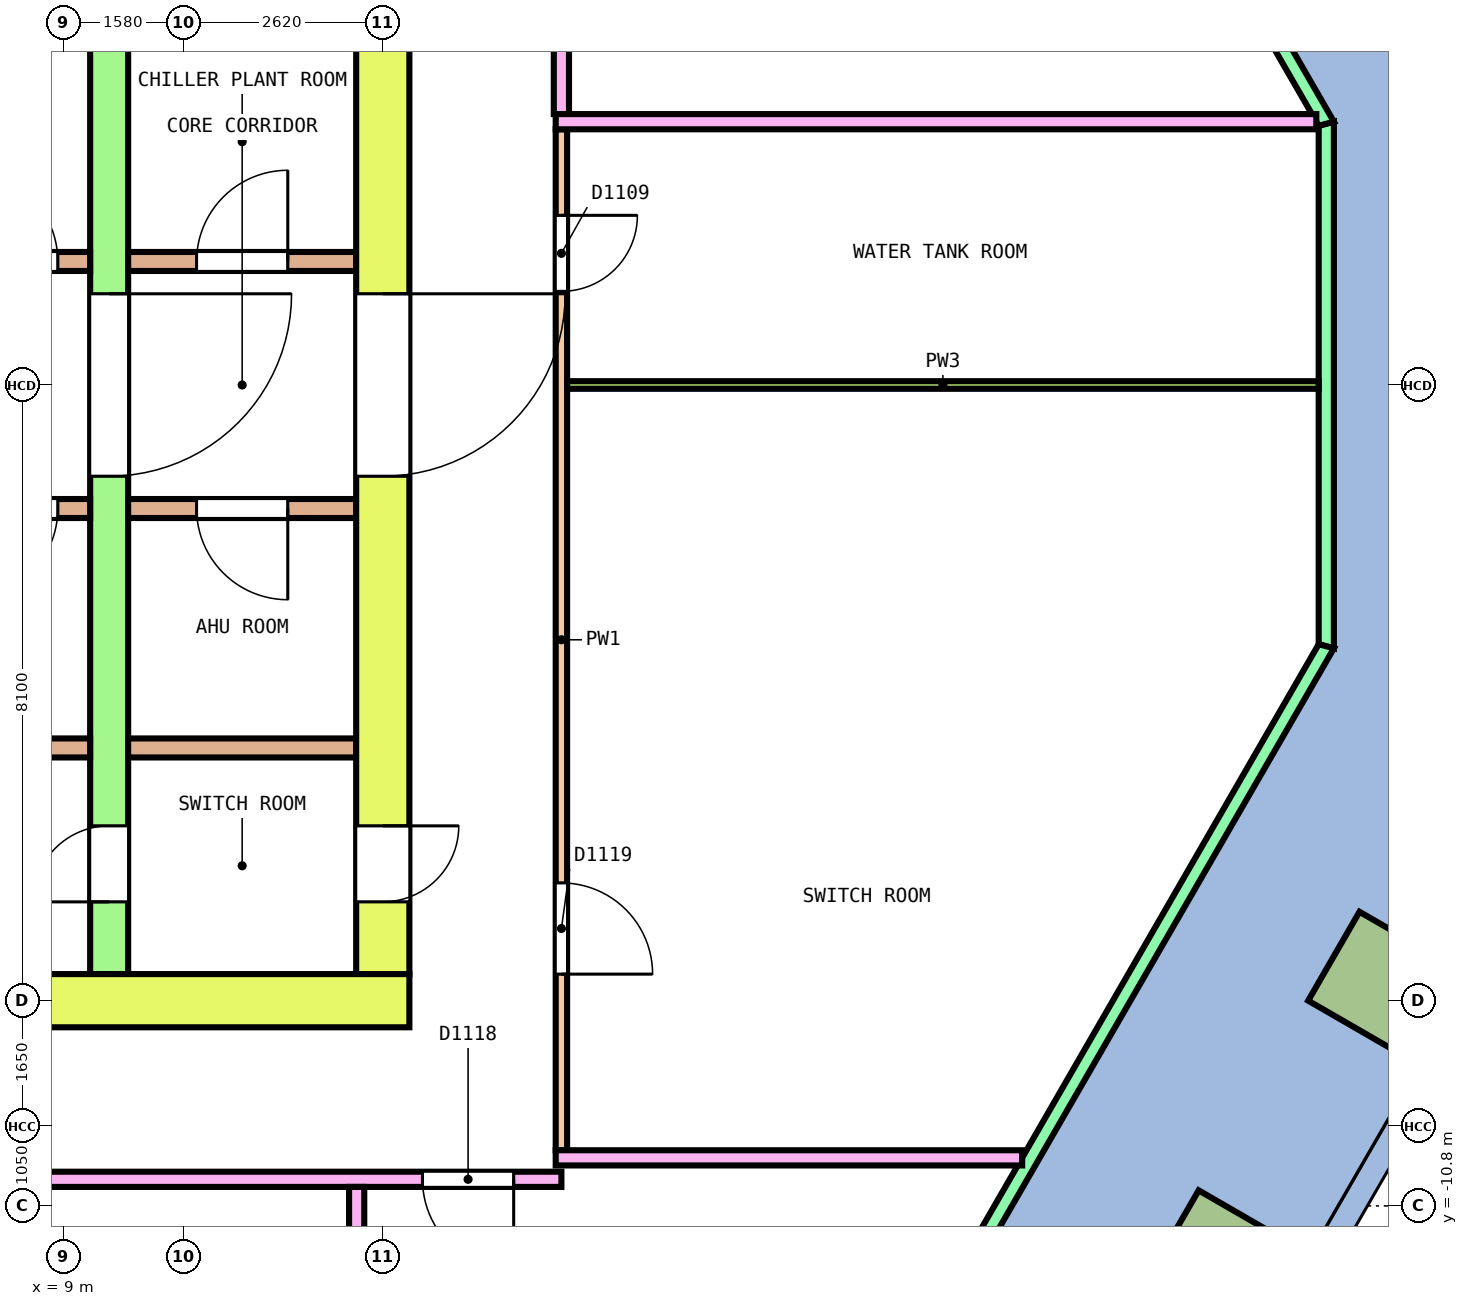
"""IFC4 building model, lengths in metres.
Left out: names, types, materials, properties, quantities, classifications, styles, units other than length and angle.
Written with IfcOpenShell. Run it as: python <this file> out.ifc"""

import sys

from ifc_helpers import new_model, si_unit, direction, frame, frame_2d, origin, origin_2d, place, context, subcontext, project, spatial, polyline, rectangle, outline, extrude, element, fill, save


model = new_model("IFC4")
c1 = context("Model", 3, precision=1e-05, world=origin(), true_north=direction((0.0, 1.0)))
c2 = subcontext(c1, "Body", "Model", "MODEL_VIEW")
j1 = project(units=[si_unit("LENGTHUNIT", "METRE"), si_unit("PLANEANGLEUNIT", "RADIAN")], contexts=[c1])
p1 = place(None, origin())
s1 = spatial("IfcSite", under=j1, at=p1, CompositionType="ELEMENT")
p2 = place(p1, origin())
s2 = spatial("IfcBuilding", under=s1, at=p2, CompositionType="ELEMENT")
p3 = place(p2, frame((0.0, 0.0, 139.6)))
s3 = spatial("IfcBuildingStorey", under=s2, at=p3, CompositionType="ELEMENT", Elevation=139.6)
for number, where, z_axis, x_axis in (
    (1, (24.181, -11.518, 0.0), (0.0, 0.0, 1.0), (0.5, 0.866, 0.0)),
    (2, (26.297, -7.853, 0.0), (0.0, 0.0, 1.0), (0.5, 0.866, 0.0)),
):
    element("IfcColumn", number, at=place(p3, frame(where, z_axis=z_axis, x_axis=x_axis)), inside=s3, PredefinedType="COLUMN", context=c2, shape_type="SweptSolid", body=[
        extrude(rectangle(XDim=1.35, YDim=1.35, at=origin_2d()), origin(), (0.0, 0.0, 1.0), 5.25),
    ])
p4 = place(p3, frame((25.613, -3.437, 0.0), z_axis=(0.0, 0.0, 1.0), x_axis=(0.0, 1.0, 0.0)))
e3 = element("IfcWall", 3, at=p4, inside=s3, PredefinedType="SOLIDWALL", context=c2, shape_type="SweptSolid", body=[
    extrude(outline(polyline([(-0.027, -0.1), (6.901, -0.1), (6.848, 0.1), (0.027, 0.1), (-0.027, -0.1)])), origin(), (0.0, 0.0, 1.0), 4.55),
])
for number, where, z_axis, x_axis in (
    (4, (25.613, 3.437, 0.0), (0.0, 0.0, 1.0), (-0.5, 0.866, 0.0)),
    (5, (15.783, -20.463, 0.0), (0.0, 0.0, 1.0), (0.5, 0.866, 0.0)),
):
    element("IfcWall", number, at=place(p3, frame(where, z_axis=z_axis, x_axis=x_axis)), inside=s3, PredefinedType="SOLIDWALL", context=c2, shape_type="SweptSolid", body=[
        extrude(outline(polyline([(-0.027, -0.1), (19.686, -0.1), (19.632, 0.1), (0.027, 0.1), (-0.027, -0.1)])), origin(), (0.0, 0.0, 1.0), 4.55),
    ])
p5 = place(p3, frame((-13.55, -8.1, 0.0), z_axis=(0.0, 0.0, 1.0), x_axis=(1.0, 0.0, 0.0)))
e6 = element("IfcWall", 6, at=p5, inside=s3, PredefinedType="SHEAR", context=c2, shape_type="SweptSolid", body=[
    extrude(rectangle(XDim=27.1, YDim=0.7, at=frame_2d((13.55, 0.0))), origin(), (0.0, 0.0, 1.0), 5.3),
])
p6 = place(p5, frame((15.1, 0.0, 0.0)))
e7 = element("IfcOpeningElement", 7, at=p6, cuts=e6, PredefinedType="OPENING", context=c2, shape_type="SweptSolid", body=[
    extrude(rectangle(XDim=1.2, YDim=2.1, at=frame_2d((0.6, 1.05))), frame((0.0, 0.36, 0.0), z_axis=(0.0, -1.0, 0.0), x_axis=(1.0, 0.0, 0.0)), (0.0, 0.0, 1.0), 0.72),
])
p7 = place(p3, frame((13.2, -7.75, 0.0), z_axis=(0.0, 0.0, 1.0), x_axis=(0.0, 1.0, 0.0)))
e8 = element("IfcWall", 8, at=p7, inside=s3, PredefinedType="SHEAR", context=c2, shape_type="SweptSolid", body=[
    extrude(rectangle(XDim=15.5, YDim=0.7, at=frame_2d((7.75, 0.0))), origin(), (0.0, 0.0, 1.0), 5.3),
])
p8 = place(p7, frame((6.55, 0.0, 0.0)))
e9 = element("IfcOpeningElement", 9, at=p8, cuts=e8, PredefinedType="OPENING", context=c2, shape_type="SweptSolid", body=[
    extrude(rectangle(XDim=2.4, YDim=2.1, at=frame_2d((1.2, 1.05))), frame((0.0, 0.36, 0.0), z_axis=(0.0, -1.0, 0.0), x_axis=(1.0, 0.0, 0.0)), (0.0, 0.0, 1.0), 0.72),
])
p9 = place(p7, frame((13.45, 0.0, 0.0)))
e10 = element("IfcOpeningElement", 10, at=p9, cuts=e8, PredefinedType="OPENING", context=c2, shape_type="SweptSolid", body=[
    extrude(rectangle(XDim=1.2, YDim=2.1, at=frame_2d((0.6, 1.05))), frame((0.0, 0.36, 0.0), z_axis=(0.0, -1.0, 0.0), x_axis=(1.0, 0.0, 0.0)), (0.0, 0.0, 1.0), 0.72),
])
p10 = place(p7, frame((0.95, 0.0, 0.0)))
e11 = element("IfcOpeningElement", 11, at=p10, cuts=e8, PredefinedType="OPENING", context=c2, shape_type="SweptSolid", body=[
    extrude(rectangle(XDim=1.0, YDim=2.1, at=frame_2d((0.5, 1.05))), frame((0.0, 0.36, 0.0), z_axis=(0.0, -1.0, 0.0), x_axis=(1.0, 0.0, 0.0)), (0.0, 0.0, 1.0), 0.72),
])
p11 = place(p3, frame((9.6, -7.75, 0.0), z_axis=(0.0, 0.0, 1.0), x_axis=(0.0, 1.0, 0.0)))
e12 = element("IfcWall", 12, at=p11, inside=s3, PredefinedType="SHEAR", context=c2, shape_type="SweptSolid", body=[
    extrude(rectangle(XDim=15.5, YDim=0.5, at=frame_2d((7.75, 0.0))), origin(), (0.0, 0.0, 1.0), 5.3),
])
p12 = place(p11, frame((6.55, 0.0, 0.0)))
e13 = element("IfcOpeningElement", 13, at=p12, cuts=e12, PredefinedType="OPENING", context=c2, shape_type="SweptSolid", body=[
    extrude(rectangle(XDim=2.4, YDim=2.1, at=frame_2d((1.2, 1.05))), frame((0.0, 0.26, 0.0), z_axis=(0.0, -1.0, 0.0), x_axis=(1.0, 0.0, 0.0)), (0.0, 0.0, 1.0), 0.52),
])
p13 = place(p11, frame((13.45, 0.0, 0.0)))
e14 = element("IfcOpeningElement", 14, at=p13, cuts=e12, PredefinedType="OPENING", context=c2, shape_type="SweptSolid", body=[
    extrude(rectangle(XDim=1.2, YDim=2.1, at=frame_2d((0.6, 1.05))), frame((0.0, 0.26, 0.0), z_axis=(0.0, -1.0, 0.0), x_axis=(1.0, 0.0, 0.0)), (0.0, 0.0, 1.0), 0.52),
])
p14 = place(p11, frame((0.95, 0.0, 0.0)))
e15 = element("IfcOpeningElement", 15, at=p14, cuts=e12, PredefinedType="OPENING", context=c2, shape_type="SweptSolid", body=[
    extrude(rectangle(XDim=1.0, YDim=2.1, at=frame_2d((0.5, 1.05))), frame((0.0, 0.26, 0.0), z_axis=(0.0, -1.0, 0.0), x_axis=(1.0, 0.0, 0.0)), (0.0, 0.0, 1.0), 0.52),
])
p15 = place(p3, frame((-9.35, 1.625, 0.0), z_axis=(0.0, 0.0, 1.0), x_axis=(1.0, 0.0, 0.0)))
e16 = element("IfcWall", 16, at=p15, inside=s3, PredefinedType="SOLIDWALL", context=c2, shape_type="SweptSolid", body=[
    extrude(rectangle(XDim=18.7, YDim=0.25, at=frame_2d((9.35, 0.0))), origin(), (0.0, 0.0, 1.0), 5.3),
])
p16 = place(p15, frame((2.85, 0.0, 0.0)))
e17 = element("IfcOpeningElement", 17, at=p16, cuts=e16, PredefinedType="OPENING", context=c2, shape_type="SweptSolid", body=[
    extrude(rectangle(XDim=1.1, YDim=2.1, at=frame_2d((0.55, 1.05))), frame((0.0, 0.135, 0.0), z_axis=(0.0, -1.0, 0.0), x_axis=(1.0, 0.0, 0.0)), (0.0, 0.0, 1.0), 0.27),
])
p17 = place(p15, frame((5.15, 0.0, 0.0)))
e18 = element("IfcOpeningElement", 18, at=p17, cuts=e16, PredefinedType="OPENING", context=c2, shape_type="SweptSolid", body=[
    extrude(rectangle(XDim=1.1, YDim=2.1, at=frame_2d((0.55, 1.05))), frame((0.0, 0.135, 0.0), z_axis=(0.0, -1.0, 0.0), x_axis=(1.0, 0.0, 0.0)), (0.0, 0.0, 1.0), 0.27),
])
p18 = place(p15, frame((14.8, 0.0, 0.0)))
e19 = element("IfcOpeningElement", 19, at=p18, cuts=e16, PredefinedType="OPENING", context=c2, shape_type="SweptSolid", body=[
    extrude(rectangle(XDim=1.1, YDim=2.1, at=frame_2d((0.55, 1.05))), frame((0.0, 0.135, 0.0), z_axis=(0.0, -1.0, 0.0), x_axis=(1.0, 0.0, 0.0)), (0.0, 0.0, 1.0), 0.27),
])
p19 = place(p15, frame((0.425, 0.0, 0.0)))
e20 = element("IfcOpeningElement", 20, at=p19, cuts=e16, PredefinedType="OPENING", context=c2, shape_type="SweptSolid", body=[
    extrude(rectangle(XDim=1.2, YDim=2.1, at=frame_2d((0.6, 1.05))), frame((0.0, 0.135, 0.0), z_axis=(0.0, -1.0, 0.0), x_axis=(1.0, 0.0, 0.0)), (0.0, 0.0, 1.0), 0.27),
])
p20 = place(p15, frame((17.075, 0.0, 0.0)))
e21 = element("IfcOpeningElement", 21, at=p20, cuts=e16, PredefinedType="OPENING", context=c2, shape_type="SweptSolid", body=[
    extrude(rectangle(XDim=1.2, YDim=2.1, at=frame_2d((0.6, 1.05))), frame((0.0, 0.135, 0.0), z_axis=(0.0, -1.0, 0.0), x_axis=(1.0, 0.0, 0.0)), (0.0, 0.0, 1.0), 0.27),
])
p21 = place(p3, frame((9.85, 1.625, 0.0), z_axis=(0.0, 0.0, 1.0), x_axis=(1.0, 0.0, 0.0)))
e22 = element("IfcWall", 22, at=p21, inside=s3, PredefinedType="SOLIDWALL", context=c2, shape_type="SweptSolid", body=[
    extrude(rectangle(XDim=3.0, YDim=0.25, at=frame_2d((1.5, 0.0))), origin(), (0.0, 0.0, 1.0), 5.3),
])
p22 = place(p21, frame((0.9, 0.0, 0.0)))
e23 = element("IfcOpeningElement", 23, at=p22, cuts=e22, PredefinedType="OPENING", context=c2, shape_type="SweptSolid", body=[
    extrude(rectangle(XDim=1.2, YDim=2.1, at=frame_2d((0.6, 1.05))), frame((0.0, 0.135, 0.0), z_axis=(0.0, -1.0, 0.0), x_axis=(1.0, 0.0, 0.0)), (0.0, 0.0, 1.0), 0.27),
])
p23 = place(p3, frame((-9.35, -1.625, 0.0), z_axis=(0.0, 0.0, 1.0), x_axis=(1.0, 0.0, 0.0)))
e24 = element("IfcWall", 24, at=p23, inside=s3, PredefinedType="SOLIDWALL", context=c2, shape_type="SweptSolid", body=[
    extrude(rectangle(XDim=18.7, YDim=0.25, at=frame_2d((9.35, 0.0))), origin(), (0.0, 0.0, 1.0), 5.3),
])
p24 = place(p23, frame((2.85, 0.0, 0.0)))
e25 = element("IfcOpeningElement", 25, at=p24, cuts=e24, PredefinedType="OPENING", context=c2, shape_type="SweptSolid", body=[
    extrude(rectangle(XDim=1.1, YDim=2.1, at=frame_2d((0.55, 1.05))), frame((0.0, 0.135, 0.0), z_axis=(0.0, -1.0, 0.0), x_axis=(1.0, 0.0, 0.0)), (0.0, 0.0, 1.0), 0.27),
])
p25 = place(p23, frame((5.15, 0.0, 0.0)))
e26 = element("IfcOpeningElement", 26, at=p25, cuts=e24, PredefinedType="OPENING", context=c2, shape_type="SweptSolid", body=[
    extrude(rectangle(XDim=1.1, YDim=2.1, at=frame_2d((0.55, 1.05))), frame((0.0, 0.135, 0.0), z_axis=(0.0, -1.0, 0.0), x_axis=(1.0, 0.0, 0.0)), (0.0, 0.0, 1.0), 0.27),
])
p26 = place(p23, frame((14.8, 0.0, 0.0)))
e27 = element("IfcOpeningElement", 27, at=p26, cuts=e24, PredefinedType="OPENING", context=c2, shape_type="SweptSolid", body=[
    extrude(rectangle(XDim=1.1, YDim=2.1, at=frame_2d((0.55, 1.05))), frame((0.0, 0.135, 0.0), z_axis=(0.0, -1.0, 0.0), x_axis=(1.0, 0.0, 0.0)), (0.0, 0.0, 1.0), 0.27),
])
p27 = place(p23, frame((0.425, 0.0, 0.0)))
e28 = element("IfcOpeningElement", 28, at=p27, cuts=e24, PredefinedType="OPENING", context=c2, shape_type="SweptSolid", body=[
    extrude(rectangle(XDim=1.2, YDim=2.1, at=frame_2d((0.6, 1.05))), frame((0.0, 0.135, 0.0), z_axis=(0.0, -1.0, 0.0), x_axis=(1.0, 0.0, 0.0)), (0.0, 0.0, 1.0), 0.27),
])
p28 = place(p23, frame((17.075, 0.0, 0.0)))
e29 = element("IfcOpeningElement", 29, at=p28, cuts=e24, PredefinedType="OPENING", context=c2, shape_type="SweptSolid", body=[
    extrude(rectangle(XDim=1.2, YDim=2.1, at=frame_2d((0.6, 1.05))), frame((0.0, 0.135, 0.0), z_axis=(0.0, -1.0, 0.0), x_axis=(1.0, 0.0, 0.0)), (0.0, 0.0, 1.0), 0.27),
])
p29 = place(p3, frame((9.85, -1.625, 0.0), z_axis=(0.0, 0.0, 1.0), x_axis=(1.0, 0.0, 0.0)))
e30 = element("IfcWall", 30, at=p29, inside=s3, PredefinedType="SOLIDWALL", context=c2, shape_type="SweptSolid", body=[
    extrude(rectangle(XDim=3.0, YDim=0.25, at=frame_2d((1.5, 0.0))), origin(), (0.0, 0.0, 1.0), 5.3),
])
p30 = place(p29, frame((0.9, 0.0, 0.0)))
e31 = element("IfcOpeningElement", 31, at=p30, cuts=e30, PredefinedType="OPENING", context=c2, shape_type="SweptSolid", body=[
    extrude(rectangle(XDim=1.2, YDim=2.1, at=frame_2d((0.6, 1.05))), frame((0.0, 0.135, 0.0), z_axis=(0.0, -1.0, 0.0), x_axis=(1.0, 0.0, 0.0)), (0.0, 0.0, 1.0), 0.27),
])
p31 = place(p3, frame((-9.35, -4.775, 0.0), z_axis=(0.0, 0.0, 1.0), x_axis=(1.0, 0.0, 0.0)))
e32 = element("IfcWall", 32, at=p31, inside=s3, PredefinedType="SOLIDWALL", context=c2, shape_type="SweptSolid", body=[
    extrude(rectangle(XDim=18.7, YDim=0.25, at=frame_2d((9.35, 0.0))), origin(), (0.0, 0.0, 1.0), 5.3),
])
p32 = place(p3, frame((9.85, -4.775, 0.0), z_axis=(0.0, 0.0, 1.0), x_axis=(1.0, 0.0, 0.0)))
e33 = element("IfcWall", 33, at=p32, inside=s3, PredefinedType="SOLIDWALL", context=c2, shape_type="SweptSolid", body=[
    extrude(rectangle(XDim=3.0, YDim=0.25, at=frame_2d((1.5, 0.0))), origin(), (0.0, 0.0, 1.0), 5.3),
])
p33 = place(p3, frame((15.55, -10.067, 0.0), z_axis=(0.0, 0.0, 1.0), x_axis=(0.0, 1.0, 0.0)))
e34 = element("IfcWall", 34, at=p33, inside=s3, PredefinedType="PARTITIONING", context=c2, shape_type="SweptSolid", body=[
    extrude(rectangle(XDim=13.431, YDim=0.15, at=frame_2d((6.716, 0.0))), origin(), (0.0, 0.0, 1.0), 4.25),
])
p34 = place(p33, frame((11.3, 0.0, 0.0)))
e35 = element("IfcOpeningElement", 35, at=p34, cuts=e34, PredefinedType="OPENING", context=c2, shape_type="SweptSolid", body=[
    extrude(rectangle(XDim=1.0, YDim=2.1, at=frame_2d((0.5, 1.05))), frame((0.0, 0.085, 0.0), z_axis=(0.0, -1.0, 0.0), x_axis=(1.0, 0.0, 0.0)), (0.0, 0.0, 1.0), 0.17),
])
p35 = place(p33, frame((2.317, 0.0, 0.0)))
e36 = element("IfcOpeningElement", 36, at=p35, cuts=e34, PredefinedType="OPENING", context=c2, shape_type="SweptSolid", body=[
    extrude(rectangle(XDim=1.2, YDim=2.1, at=frame_2d((0.6, 1.05))), frame((0.0, 0.085, 0.0), z_axis=(0.0, -1.0, 0.0), x_axis=(1.0, 0.0, 0.0)), (0.0, 0.0, 1.0), 0.17),
])
p36 = place(p3, frame((15.625, 0.0, 0.0), z_axis=(0.0, 0.0, 1.0), x_axis=(1.0, 0.0, 0.0)))
e37 = element("IfcWall", 37, at=p36, inside=s3, PredefinedType="PARTITIONING", context=c2, shape_type="SweptSolid", body=[
    extrude(rectangle(XDim=9.888, YDim=0.1, at=frame_2d((4.944, 0.0))), origin(), (0.0, 0.0, 1.0), 4.25),
])
p37 = place(p3, frame((15.55, 3.564, 0.0), z_axis=(0.0, 0.0, 1.0), x_axis=(0.0, 1.0, 0.0)))
e38 = element("IfcWall", 38, at=p37, inside=s3, PredefinedType="PARTITIONING", context=c2, shape_type="SweptSolid", body=[
    extrude(rectangle(XDim=6.786, YDim=0.2, at=frame_2d((3.393, 0.0))), origin(), (0.0, 0.0, 1.0), 4.25),
])
p38 = place(p37, frame((2.03, 0.0, 0.0)))
e39 = element("IfcOpeningElement", 39, at=p38, cuts=e38, PredefinedType="OPENING", context=c2, shape_type="SweptSolid", body=[
    extrude(rectangle(XDim=1.2, YDim=2.1, at=frame_2d((0.6, 1.05))), frame((0.0, 0.11, 0.0), z_axis=(0.0, -1.0, 0.0), x_axis=(1.0, 0.0, 0.0)), (0.0, 0.0, 1.0), 0.22),
])
p39 = place(p3, frame((-2.016, -10.45, 0.0), z_axis=(0.0, 0.0, 1.0), x_axis=(1.0, 0.0, 0.0)))
e40 = element("IfcWall", 40, at=p39, inside=s3, PredefinedType="PARTITIONING", context=c2, shape_type="SweptSolid", body=[
    extrude(rectangle(XDim=17.566, YDim=0.2, at=frame_2d((8.783, 0.0))), origin(), (0.0, 0.0, 1.0), 4.25),
])
p40 = place(p39, frame((6.786, 0.0, 0.0)))
e41 = element("IfcOpeningElement", 41, at=p40, cuts=e40, PredefinedType="OPENING", context=c2, shape_type="SweptSolid", body=[
    extrude(rectangle(XDim=1.2, YDim=2.1, at=frame_2d((0.6, 1.05))), frame((0.0, 0.11, 0.0), z_axis=(0.0, -1.0, 0.0), x_axis=(1.0, 0.0, 0.0)), (0.0, 0.0, 1.0), 0.22),
])
p41 = place(p39, frame((15.738, 0.0, 0.0)))
e42 = element("IfcOpeningElement", 42, at=p41, cuts=e40, PredefinedType="OPENING", context=c2, shape_type="SweptSolid", body=[
    extrude(rectangle(XDim=1.2, YDim=2.1, at=frame_2d((0.6, 1.05))), frame((0.0, 0.11, 0.0), z_axis=(0.0, -1.0, 0.0), x_axis=(1.0, 0.0, 0.0)), (0.0, 0.0, 1.0), 0.22),
])
p42 = place(p3, frame((15.475, 3.464, 0.0), z_axis=(0.0, 0.0, 1.0), x_axis=(1.0, 0.0, 0.0)))
e43 = element("IfcWall", 43, at=p42, inside=s3, PredefinedType="PARTITIONING", context=c2, shape_type="SweptSolid", body=[
    extrude(rectangle(XDim=10.007, YDim=0.2, at=frame_2d((5.003, 0.0))), origin(), (0.0, 0.0, 1.0), 4.25),
])
p43 = place(p3, frame((12.856, -22.037, 0.0), z_axis=(0.0, 0.0, 1.0), x_axis=(0.0, 1.0, 0.0)))
e44 = element("IfcWall", 44, at=p43, inside=s3, PredefinedType="PARTITIONING", context=c2, shape_type="SweptSolid", body=[
    extrude(rectangle(XDim=11.487, YDim=0.2, at=frame_2d((5.744, 0.0))), origin(), (0.0, 0.0, 1.0), 4.25),
])
p44 = place(p3, frame((15.475, -10.167, 0.0), z_axis=(0.0, 0.0, 1.0), x_axis=(1.0, 0.0, 0.0)))
e45 = element("IfcWall", 45, at=p44, inside=s3, PredefinedType="PARTITIONING", context=c2, shape_type="SweptSolid", body=[
    extrude(rectangle(XDim=6.137, YDim=0.2, at=frame_2d((3.068, 0.0))), origin(), (0.0, 0.0, 1.0), 4.25),
])
p45 = place(p12, origin())
e46 = element("IfcDoor", 46, at=p45, inside=s3, OperationType="DOUBLE_DOOR_SINGLE_SWING", PredefinedType="DOOR", context=c2, shape_type="SweptSolid", body=[
    extrude(rectangle(XDim=2.4, YDim=2.1, at=frame_2d((1.2, 1.05))), frame((0.0, 0.2, 0.0), z_axis=(0.0, -1.0, 0.0), x_axis=(1.0, 0.0, 0.0)), (0.0, 0.0, 1.0), 0.4),
])
fill(e13, e46)
p46 = place(p8, origin())
e47 = element("IfcDoor", 47, at=p46, inside=s3, OperationType="DOUBLE_DOOR_SINGLE_SWING", PredefinedType="DOOR", context=c2, shape_type="SweptSolid", body=[
    extrude(rectangle(XDim=2.4, YDim=2.1, at=frame_2d((1.2, 1.05))), frame((0.0, 0.3, 0.0), z_axis=(0.0, -1.0, 0.0), x_axis=(1.0, 0.0, 0.0)), (0.0, 0.0, 1.0), 0.6),
])
fill(e9, e47)
p47 = place(p14, origin())
e48 = element("IfcDoor", 48, at=p47, inside=s3, OperationType="SINGLE_SWING_RIGHT", PredefinedType="DOOR", context=c2, shape_type="SweptSolid", body=[
    extrude(rectangle(XDim=1.0, YDim=2.1, at=frame_2d((0.5, 1.05))), frame((0.0, 0.2, 0.0), z_axis=(0.0, -1.0, 0.0), x_axis=(1.0, 0.0, 0.0)), (0.0, 0.0, 1.0), 0.4),
])
fill(e15, e48)
p48 = place(p10, origin())
e49 = element("IfcDoor", 49, at=p48, inside=s3, OperationType="SINGLE_SWING_LEFT", PredefinedType="DOOR", context=c2, shape_type="SweptSolid", body=[
    extrude(rectangle(XDim=1.0, YDim=2.1, at=frame_2d((0.5, 1.05))), frame((0.0, 0.3, 0.0), z_axis=(0.0, -1.0, 0.0), x_axis=(1.0, 0.0, 0.0)), (0.0, 0.0, 1.0), 0.6),
])
fill(e11, e49)
p49 = place(p20, origin())
e50 = element("IfcDoor", 50, at=p49, inside=s3, OperationType="SINGLE_SWING_RIGHT", PredefinedType="DOOR", context=c2, shape_type="SweptSolid", body=[
    extrude(rectangle(XDim=1.2, YDim=2.1, at=frame_2d((0.6, 1.05))), frame((0.0, 0.075, 0.0), z_axis=(0.0, -1.0, 0.0), x_axis=(1.0, 0.0, 0.0)), (0.0, 0.0, 1.0), 0.15),
])
fill(e21, e50)
p50 = place(p22, origin())
e51 = element("IfcDoor", 51, at=p50, inside=s3, OperationType="SINGLE_SWING_LEFT", PredefinedType="DOOR", context=c2, shape_type="SweptSolid", body=[
    extrude(rectangle(XDim=1.2, YDim=2.1, at=frame_2d((0.6, 1.05))), frame((0.0, 0.075, 0.0), z_axis=(0.0, -1.0, 0.0), x_axis=(1.0, 0.0, 0.0)), (0.0, 0.0, 1.0), 0.15),
])
fill(e23, e51)
p51 = place(p28, origin())
e52 = element("IfcDoor", 52, at=p51, inside=s3, OperationType="SINGLE_SWING_RIGHT", PredefinedType="DOOR", context=c2, shape_type="SweptSolid", body=[
    extrude(rectangle(XDim=1.2, YDim=2.1, at=frame_2d((0.6, 1.05))), frame((0.0, 0.075, 0.0), z_axis=(0.0, -1.0, 0.0), x_axis=(1.0, 0.0, 0.0)), (0.0, 0.0, 1.0), 0.15),
])
fill(e29, e52)
p52 = place(p30, origin())
e53 = element("IfcDoor", 53, at=p52, inside=s3, OperationType="SINGLE_SWING_LEFT", PredefinedType="DOOR", context=c2, shape_type="SweptSolid", body=[
    extrude(rectangle(XDim=1.2, YDim=2.1, at=frame_2d((0.6, 1.05))), frame((0.0, 0.075, 0.0), z_axis=(0.0, -1.0, 0.0), x_axis=(1.0, 0.0, 0.0)), (0.0, 0.0, 1.0), 0.15),
])
fill(e31, e53)
p53 = place(p34, origin())
e54 = element("IfcDoor", 54, at=p53, inside=s3, OperationType="SINGLE_SWING_LEFT", PredefinedType="DOOR", context=c2, shape_type="SweptSolid", body=[
    extrude(rectangle(XDim=1.0, YDim=2.1, at=frame_2d((0.5, 1.05))), frame((0.0, 0.025, 0.0), z_axis=(0.0, -1.0, 0.0), x_axis=(1.0, 0.0, 0.0)), (0.0, 0.0, 1.0), 0.05),
])
fill(e35, e54)
p54 = place(p41, origin())
e55 = element("IfcDoor", 55, at=p54, inside=s3, OperationType="DOUBLE_DOOR_SINGLE_SWING", PredefinedType="DOOR", context=c2, shape_type="SweptSolid", body=[
    extrude(rectangle(XDim=1.2, YDim=2.1, at=frame_2d((0.6, 1.05))), frame((0.0, 0.025, 0.0), z_axis=(0.0, -1.0, 0.0), x_axis=(1.0, 0.0, 0.0)), (0.0, 0.0, 1.0), 0.05),
])
fill(e42, e55)
p55 = place(p35, origin())
e56 = element("IfcDoor", 56, at=p55, inside=s3, OperationType="DOUBLE_DOOR_SINGLE_SWING", PredefinedType="DOOR", context=c2, shape_type="SweptSolid", body=[
    extrude(rectangle(XDim=1.2, YDim=2.1, at=frame_2d((0.6, 1.05))), frame((0.0, 0.025, 0.0), z_axis=(0.0, -1.0, 0.0), x_axis=(1.0, 0.0, 0.0)), (0.0, 0.0, 1.0), 0.05),
])
fill(e36, e56)
save(model, sys.argv[1])
